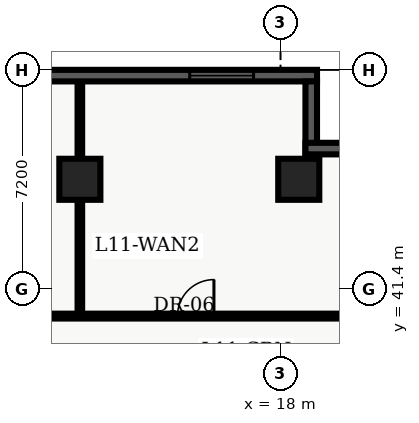
"""IFC4 building model, lengths in metres.
Left out: names, types, materials, properties, quantities, classifications, styles, units other than length and angle.
Written with IfcOpenShell. Run it as: python <this file> out.ifc"""

import sys

from ifc_helpers import new_model, entity, si_unit, converted_unit, direction, frame, origin_with_axes, origin_2d_with_axis, place, context, subcontext, project, spatial, polyline, rectangle, outline, extrude, element, fill, save


model = new_model("IFC4")
c1 = context("Model", 3, precision=1e-05, world=origin_with_axes(), true_north=direction((0.0, 1.0)))
c2 = subcontext(c1, "Body", "Model", "MODEL_VIEW")
j1 = project(units=[si_unit("LENGTHUNIT", "METRE"), converted_unit("PLANEANGLEUNIT", "DEGREE", entity("IfcPlaneAngleMeasure", 0.017), si_unit("PLANEANGLEUNIT", "RADIAN"), dimensions=[0, 0, 0, 0, 0, 0, 0])], contexts=[c1])
p1 = place(None, origin_with_axes())
s1 = spatial("IfcSite", under=j1, at=p1, CompositionType="ELEMENT")
p2 = place(p1, origin_with_axes())
s2 = spatial("IfcBuilding", under=s1, at=p2, CompositionType="ELEMENT")
p3 = place(p2, frame((0.0, 0.0, 48.3), z_axis=(0.0, 0.0, 1.0), x_axis=(1.0, 0.0, 0.0)))
s3 = spatial("IfcBuildingStorey", under=s2, at=p3, CompositionType="ELEMENT", Elevation=48.3)
for number, where, z_axis, x_axis in (
    (1, (11.4, 45.0, 0.0), (0.0, 0.0, 1.0), (1.0, 0.0, 0.0)),
    (2, (18.6, 45.0, 0.0), (0.0, 0.0, 1.0), (1.0, 0.0, 0.0)),
):
    element("IfcColumn", number, at=place(p3, frame(where, z_axis=z_axis, x_axis=x_axis)), inside=s3, PredefinedType="COLUMN", context=c2, shape_type="SweptSolid", body=[
        extrude(rectangle(XDim=1.35, YDim=1.35, at=origin_2d_with_axis()), origin_with_axes(), (0.0, 0.0, 1.0), 3.9),
    ])
p4 = place(p3, frame((2.6, 40.5, 0.0), z_axis=(0.0, 0.0, 1.0), x_axis=(1.0, 0.0, 0.0)))
e3 = element("IfcWall", 3, at=p4, inside=s3, PredefinedType="PARTITIONING", context=c2, shape_type="SweptSolid", body=[
    extrude(outline(polyline([(0.0, -0.08), (18.65, -0.08), (18.65, 0.08), (0.0, 0.08), (0.0, -0.08)])), origin_with_axes(), (0.0, 0.0, 1.0), 2.7),
])
p5 = place(p4, frame((5.275, 0.0, 0.0), z_axis=(0.0, 0.0, 1.0), x_axis=(1.0, 0.0, 0.0)))
e4 = element("IfcOpeningElement", 4, at=p5, cuts=e3, PredefinedType="OPENING", context=c2, shape_type="SweptSolid", body=[
    extrude(rectangle(XDim=1.0, YDim=0.18, at=origin_2d_with_axis()), origin_with_axes(), (0.0, 0.0, 1.0), 2.15),
])
p6 = place(p4, frame((12.61, 0.0, 0.0), z_axis=(0.0, 0.0, 1.0), x_axis=(1.0, 0.0, 0.0)))
e5 = element("IfcOpeningElement", 5, at=p6, cuts=e3, PredefinedType="OPENING", context=c2, shape_type="SweptSolid", body=[
    extrude(rectangle(XDim=1.2, YDim=0.18, at=origin_2d_with_axis()), origin_with_axes(), (0.0, 0.0, 1.0), 2.2),
])
p7 = place(p3, frame((11.4, 40.6, 0.0), z_axis=(0.0, 0.0, 1.0), x_axis=(0.0, 1.0, 0.0)))
e6 = element("IfcWall", 6, at=p7, inside=s3, PredefinedType="PARTITIONING", context=c2, shape_type="SweptSolid", body=[
    extrude(outline(polyline([(0.0, -0.075), (7.64, -0.075), (7.64, 0.075), (0.0, 0.075), (0.0, -0.075)])), origin_with_axes(), (0.0, 0.0, 1.0), 2.7),
])
p8 = place(p3, frame((2.78, 48.41, 0.0), z_axis=(0.0, 0.0, 1.0), x_axis=(1.0, 0.0, 0.0)))
e7 = element("IfcWall", 7, at=p8, inside=s3, PredefinedType="SOLIDWALL", context=c2, shape_type="SweptSolid", body=[
    extrude(outline(polyline([(0.0, -0.19), (16.42, -0.19), (16.42, 0.19), (0.0, 0.19), (0.0, -0.19)])), origin_with_axes(), (0.0, 0.0, 1.0), 3.66),
])
p9 = place(p8, frame((3.137, 0.0, 0.45), z_axis=(0.0, 0.0, 1.0), x_axis=(1.0, 0.0, 0.0)))
e8 = element("IfcOpeningElement", 8, at=p9, cuts=e7, PredefinedType="OPENING", context=c2, shape_type="SweptSolid", body=[
    extrude(rectangle(XDim=2.1, YDim=0.4, at=origin_2d_with_axis()), origin_with_axes(), (0.0, 0.0, 1.0), 2.2),
])
p10 = place(p8, frame((13.283, 0.0, 0.45), z_axis=(0.0, 0.0, 1.0), x_axis=(1.0, 0.0, 0.0)))
e9 = element("IfcOpeningElement", 9, at=p10, cuts=e7, PredefinedType="OPENING", context=c2, shape_type="SweptSolid", body=[
    extrude(rectangle(XDim=2.1, YDim=0.4, at=origin_2d_with_axis()), origin_with_axes(), (0.0, 0.0, 1.0), 2.2),
])
p11 = place(p3, frame((19.01, 48.22, 0.0), z_axis=(0.0, 0.0, 1.0), x_axis=(0.0, -1.0, 0.0)))
e10 = element("IfcWall", 10, at=p11, inside=s3, PredefinedType="SOLIDWALL", context=c2, shape_type="SweptSolid", body=[
    extrude(outline(polyline([(0.0, -0.19), (2.56, -0.19), (2.56, 0.19), (0.0, 0.19), (0.0, -0.19)])), origin_with_axes(), (0.0, 0.0, 1.0), 3.66),
])
p12 = place(p3, frame((18.82, 46.01, 0.0), z_axis=(0.0, 0.0, 1.0), x_axis=(1.0, 0.0, 0.0)))
e11 = element("IfcWall", 11, at=p12, inside=s3, PredefinedType="SOLIDWALL", context=c2, shape_type="SweptSolid", body=[
    extrude(outline(polyline([(0.0, -0.19), (2.78, -0.19), (2.78, 0.19), (0.0, 0.19), (0.0, -0.19)])), origin_with_axes(), (0.0, 0.0, 1.0), 3.66),
])
p13 = place(p4, frame((12.61, 0.0, 0.0), z_axis=(0.0, 0.0, 1.0), x_axis=(1.0, 0.0, 0.0)))
e12 = element("IfcDoor", 12, at=p13, inside=s3, OperationType="SINGLE_SWING_RIGHT", PredefinedType="DOOR", context=c2, shape_type="SweptSolid", body=[
    extrude(rectangle(XDim=1.2, YDim=0.09, at=origin_2d_with_axis()), origin_with_axes(), (0.0, 0.0, 1.0), 2.2),
])
fill(e5, e12)
p14 = place(p8, frame((13.283, 0.0, 0.45), z_axis=(0.0, 0.0, 1.0), x_axis=(1.0, 0.0, 0.0)))
e13 = element("IfcWindow", 13, at=p14, inside=s3, PredefinedType="WINDOW", context=c2, shape_type="SweptSolid", body=[
    extrude(rectangle(XDim=2.1, YDim=0.09, at=origin_2d_with_axis()), origin_with_axes(), (0.0, 0.0, 1.0), 2.2),
])
fill(e9, e13)
save(model, sys.argv[1])
